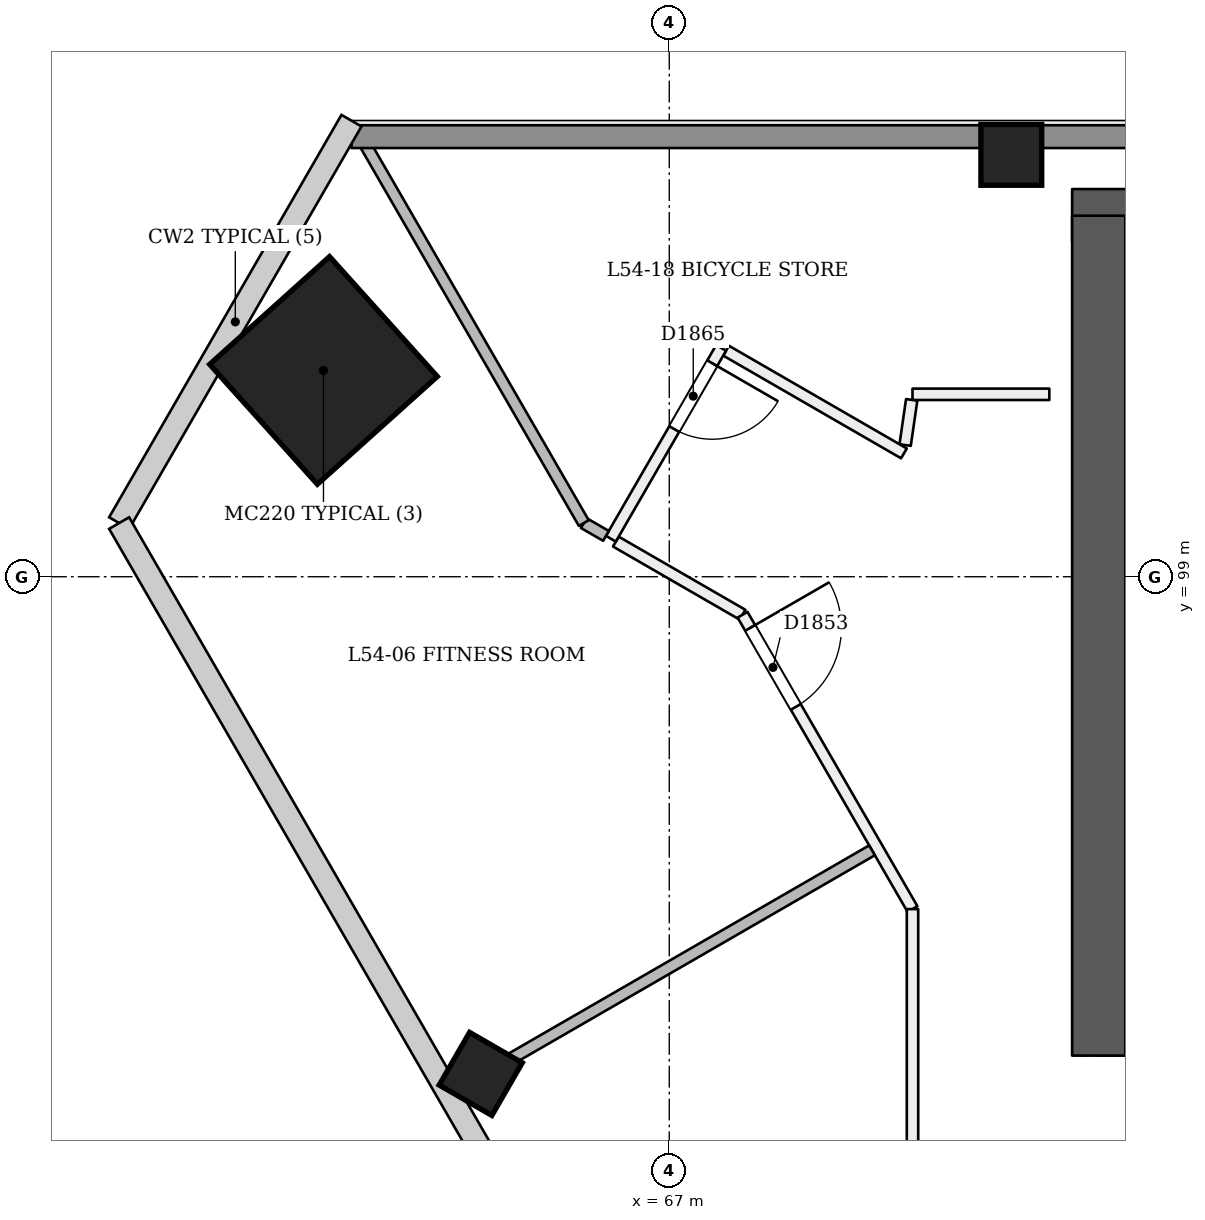
"""IFC4 building model, lengths in metres.
Left out: names, types, materials, properties, quantities, classifications, styles, units other than length and angle.
Written with IfcOpenShell. Run it as: python <this file> out.ifc"""

import sys

from ifc_helpers import new_model, si_unit, direction, frame, frame_2d, origin, origin_2d, place, context, subcontext, project, spatial, rectangle, extrude, element, fill, save


model = new_model("IFC4")
c1 = context("Model", 3, precision=1e-05, world=origin(), true_north=direction((0.0, 1.0)))
c2 = subcontext(c1, "Body", "Model", "MODEL_VIEW")
j1 = project(units=[si_unit("LENGTHUNIT", "METRE"), si_unit("PLANEANGLEUNIT", "RADIAN")], contexts=[c1])
p1 = place(None, origin())
s1 = spatial("IfcSite", under=j1, at=p1, CompositionType="ELEMENT")
p2 = place(p1, origin())
s2 = spatial("IfcBuilding", under=s1, at=p2, CompositionType="ELEMENT")
p3 = place(p2, frame((0.0, 0.0, 208.8)))
s3 = spatial("IfcBuildingStorey", under=s2, at=p3, CompositionType="ELEMENT", Elevation=208.8)
p4 = place(p3, frame((72.65, 93.05, 0.0), z_axis=(0.0, 0.0, 1.0), x_axis=(1.0, 0.0, 0.0)))
e1 = element("IfcWall", 1, at=p4, inside=s3, PredefinedType="SHEAR", context=c2, shape_type="SweptSolid", body=[
    extrude(rectangle(XDim=25.05, YDim=0.7, at=frame_2d((12.525, 0.0))), origin(), (0.0, 0.0, 1.0), 3.6),
])
p5 = place(p4, frame((1.15, 0.0, 0.0)))
e2 = element("IfcOpeningElement", 2, at=p5, cuts=e1, PredefinedType="OPENING", context=c2, shape_type="SweptSolid", body=[
    extrude(rectangle(XDim=1.2, YDim=2.1, at=frame_2d((0.6, 1.05))), frame((0.0, 0.36, 0.0), z_axis=(0.0, -1.0, 0.0), x_axis=(1.0, 0.0, 0.0)), (0.0, 0.0, 1.0), 0.721),
])
p6 = place(p4, frame((3.35, 0.0, 0.0)))
e3 = element("IfcOpeningElement", 3, at=p6, cuts=e1, PredefinedType="OPENING", context=c2, shape_type="SweptSolid", body=[
    extrude(rectangle(XDim=1.2, YDim=2.1, at=frame_2d((0.6, 1.05))), frame((0.0, 0.36, 0.0), z_axis=(0.0, -1.0, 0.0), x_axis=(1.0, 0.0, 0.0)), (0.0, 0.0, 1.0), 0.721),
])
p7 = place(p4, frame((13.35, 0.0, 0.0)))
e4 = element("IfcOpeningElement", 4, at=p7, cuts=e1, PredefinedType="OPENING", context=c2, shape_type="SweptSolid", body=[
    extrude(rectangle(XDim=1.2, YDim=2.1, at=frame_2d((0.6, 1.05))), frame((0.0, 0.36, 0.0), z_axis=(0.0, -1.0, 0.0), x_axis=(1.0, 0.0, 0.0)), (0.0, 0.0, 1.0), 0.721),
])
p8 = place(p4, frame((16.212, 0.0, 0.0)))
e5 = element("IfcOpeningElement", 5, at=p8, cuts=e1, PredefinedType="OPENING", context=c2, shape_type="SweptSolid", body=[
    extrude(rectangle(XDim=1.0, YDim=2.1, at=frame_2d((0.5, 1.05))), frame((0.0, 0.36, 0.0), z_axis=(0.0, -1.0, 0.0), x_axis=(1.0, 0.0, 0.0)), (0.0, 0.0, 1.0), 0.721),
])
p9 = place(p4, frame((19.65, 0.0, 0.0)))
e6 = element("IfcOpeningElement", 6, at=p9, cuts=e1, PredefinedType="OPENING", context=c2, shape_type="SweptSolid", body=[
    extrude(rectangle(XDim=1.0, YDim=2.1, at=frame_2d((0.5, 1.05))), frame((0.0, 0.36, 0.0), z_axis=(0.0, -1.0, 0.0), x_axis=(1.0, 0.0, 0.0)), (0.0, 0.0, 1.0), 0.721),
])
p10 = place(p4, frame((22.637, 0.0, 0.0)))
e7 = element("IfcOpeningElement", 7, at=p10, cuts=e1, PredefinedType="OPENING", context=c2, shape_type="SweptSolid", body=[
    extrude(rectangle(XDim=1.0, YDim=2.1, at=frame_2d((0.5, 1.05))), frame((0.0, 0.36, 0.0), z_axis=(0.0, -1.0, 0.0), x_axis=(1.0, 0.0, 0.0)), (0.0, 0.0, 1.0), 0.721),
])
p11 = place(p3, frame((97.35, 103.75, 0.0), z_axis=(0.0, 0.0, 1.0), x_axis=(-1.0, 0.0, 0.0)))
e8 = element("IfcWall", 8, at=p11, inside=s3, PredefinedType="SHEAR", context=c2, shape_type="SweptSolid", body=[
    extrude(rectangle(XDim=25.05, YDim=0.7, at=frame_2d((12.525, 0.0))), origin(), (0.0, 0.0, 1.0), 3.6),
])
p12 = place(p3, frame((72.65, 103.75, 0.0), z_axis=(0.0, 0.0, 1.0), x_axis=(0.0, -1.0, 0.0)))
e9 = element("IfcWall", 9, at=p12, inside=s3, PredefinedType="SHEAR", context=c2, shape_type="SweptSolid", body=[
    extrude(rectangle(XDim=11.05, YDim=0.7, at=frame_2d((5.525, 0.0))), origin(), (0.0, 0.0, 1.0), 3.6),
])
p13 = place(p3, frame((62.417, 101.703, 0.0), z_axis=(0.028403721265, 0.009287135593, 0.999553389135), x_axis=(-0.866209208882, 0.499282066984, 0.019975585985)))
e10 = element("IfcColumn", 10, at=p13, inside=s3, PredefinedType="COLUMN", context=c2, shape_type="SweptSolid", body=[
    extrude(rectangle(XDim=2.12, YDim=2.12, at=origin_2d()), origin(), (0.0, 0.0, 1.0), 3.602),
])
p14 = place(p3, frame((71.5, 104.55, 0.0), z_axis=(0.0, 0.0, 1.0), x_axis=(1.0, 0.0, 0.0)))
e11 = element("IfcColumn", 11, at=p14, inside=s3, PredefinedType="COLUMN", context=c2, shape_type="SweptSolid", body=[
    extrude(rectangle(XDim=0.8, YDim=0.8, at=origin_2d()), origin(), (0.0, 0.0, 1.0), 3.6),
])
p15 = place(p3, frame((64.492, 92.412, -0.024), z_axis=(0.02215369191, 0.038413282303, 0.999016333038), x_axis=(-0.865364661836, -0.499669122996, 0.038402728683)))
e12 = element("IfcColumn", 12, at=p15, inside=s3, PredefinedType="COLUMN", context=c2, shape_type="SweptSolid", body=[
    extrude(rectangle(XDim=0.8, YDim=0.8, at=origin_2d()), origin(), (0.0, 0.0, 1.0), 3.604),
])
p16 = place(p3, frame((66.297, 99.462, 0.0), z_axis=(0.0, 0.0, 1.0), x_axis=(0.866033512162, -0.499985955615, 0.0)))
e13 = element("IfcWall", 13, at=p16, inside=s3, PredefinedType="PARTITIONING", context=c2, shape_type="SweptSolid", body=[
    extrude(rectangle(XDim=1.925, YDim=0.15, at=frame_2d((0.962, 0.0))), origin(), (0.0, 0.0, 1.0), 3.3),
])
p17 = place(p3, frame((67.964, 98.5, 0.0), z_axis=(0.0, 0.0, 1.0), x_axis=(0.500002867593, -0.866023748172, 0.0)))
e14 = element("IfcWall", 14, at=p17, inside=s3, PredefinedType="PARTITIONING", context=c2, shape_type="SweptSolid", body=[
    extrude(rectangle(XDim=4.472, YDim=0.15, at=frame_2d((2.236, 0.0))), origin(), (0.0, 0.0, 1.0), 3.3),
])
p18 = place(p17, frame((0.2, 0.0, 0.0)))
e15 = element("IfcOpeningElement", 15, at=p18, cuts=e14, PredefinedType="OPENING", context=c2, shape_type="SweptSolid", body=[
    extrude(rectangle(XDim=1.2, YDim=2.1, at=frame_2d((0.6, 1.05))), frame((0.0, 0.085, 0.0), z_axis=(0.0, -1.0, 0.0), x_axis=(1.0, 0.0, 0.0)), (0.0, 0.0, 1.0), 0.171),
])
p19 = place(p3, frame((70.2, 94.627, 0.0), z_axis=(0.0, 0.0, 1.0), x_axis=(0.0, -1.0, 0.0)))
e16 = element("IfcWall", 16, at=p19, inside=s3, PredefinedType="PARTITIONING", context=c2, shape_type="SweptSolid", body=[
    extrude(rectangle(XDim=4.427, YDim=0.15, at=frame_2d((2.214, 0.0))), origin(), (0.0, 0.0, 1.0), 3.3),
])
p20 = place(p3, frame((72.0, 101.4, 0.0), z_axis=(0.0, 0.0, 1.0), x_axis=(-1.0, 0.0, 0.0)))
e17 = element("IfcWall", 17, at=p20, inside=s3, PredefinedType="PARTITIONING", context=c2, shape_type="SweptSolid", body=[
    extrude(rectangle(XDim=1.8, YDim=0.15, at=frame_2d((0.9, 0.0))), origin(), (0.0, 0.0, 1.0), 3.3),
])
p21 = place(p3, frame((70.189, 101.327, 0.0), z_axis=(0.0, 0.0, 1.0), x_axis=(-0.143925367689, -0.989588545071, 0.0)))
e18 = element("IfcWall", 18, at=p21, inside=s3, PredefinedType="PARTITIONING", context=c2, shape_type="SweptSolid", body=[
    extrude(rectangle(XDim=0.601, YDim=0.15, at=frame_2d((0.3, 0.0))), origin(), (0.0, 0.0, 1.0), 3.3),
])
p22 = place(p3, frame((70.087, 100.623, 0.0), z_axis=(0.0, 0.0, 1.0), x_axis=(-0.866060705498, 0.499938850654, 0.0)))
e19 = element("IfcWall", 19, at=p22, inside=s3, PredefinedType="PARTITIONING", context=c2, shape_type="SweptSolid", body=[
    extrude(rectangle(XDim=2.702, YDim=0.15, at=frame_2d((1.351, 0.0))), origin(), (0.0, 0.0, 1.0), 3.3),
])
p23 = place(p3, frame((67.682, 102.011, 0.0), z_axis=(0.0, 0.0, 1.0), x_axis=(-0.499987231761, -0.866032775405, 0.0)))
e20 = element("IfcWall", 20, at=p23, inside=s3, PredefinedType="PARTITIONING", context=c2, shape_type="SweptSolid", body=[
    extrude(rectangle(XDim=2.9, YDim=0.15, at=frame_2d((1.45, 0.0))), origin(), (0.0, 0.0, 1.0), 3.3),
])
p24 = place(p23, frame((0.234, 0.0, 0.0)))
e21 = element("IfcOpeningElement", 21, at=p24, cuts=e20, PredefinedType="OPENING", context=c2, shape_type="SweptSolid", body=[
    extrude(rectangle(XDim=1.0, YDim=2.1, at=frame_2d((0.5, 1.05))), frame((0.0, 0.085, 0.0), z_axis=(0.0, -1.0, 0.0), x_axis=(1.0, 0.0, 0.0)), (0.0, 0.0, 1.0), 0.171),
])
p25 = place(p3, frame((64.189, 92.238, 0.0), z_axis=(0.0, 0.0, 1.0), x_axis=(0.866042250622, 0.499970819286, 0.0)))
e22 = element("IfcWall", 22, at=p25, inside=s3, PredefinedType="PARTITIONING", context=c2, shape_type="SweptSolid", body=[
    extrude(rectangle(XDim=6.325, YDim=0.15, at=frame_2d((3.163, 0.0))), origin(), (0.0, 0.0, 1.0), 2.8),
])
p26 = place(p3, frame((66.167, 99.538, 0.0), z_axis=(0.0, 0.0, 1.0), x_axis=(-0.866004557827, 0.500036104519, 0.0)))
e23 = element("IfcWall", 23, at=p26, inside=s3, PredefinedType="PARTITIONING", context=c2, shape_type="SweptSolid", body=[
    extrude(rectangle(XDim=0.337, YDim=0.15, at=frame_2d((0.168, 0.0))), origin(), (0.0, 0.0, 1.0), 3.3),
])
p27 = place(p3, frame((65.875, 99.706, 0.0), z_axis=(0.0, 0.0, 1.0), x_axis=(-0.500013750211, 0.866017464951, 0.0)))
e24 = element("IfcWall", 24, at=p27, inside=s3, PredefinedType="PARTITIONING", context=c2, shape_type="SweptSolid", body=[
    extrude(rectangle(XDim=5.997, YDim=0.15, at=frame_2d((2.999, 0.0))), origin(), (0.0, 0.0, 1.0), 2.8),
])
p28 = place(p3, frame((62.819, 104.79, 0.0), z_axis=(0.0, 0.0, 1.0), x_axis=(1.0, 0.0, 0.0)))
e25 = element("IfcWall", 25, at=p28, inside=s3, PredefinedType="SOLIDWALL", context=c2, shape_type="SweptSolid", body=[
    extrude(rectangle(XDim=44.362, YDim=0.3, at=frame_2d((22.181, 0.0))), origin(), (0.0, 0.0, 1.0), 2.8),
])
p29 = place(p18, origin())
e26 = element("IfcDoor", 26, at=p29, inside=s3, OperationType="SINGLE_SWING_LEFT", PredefinedType="NOTDEFINED", context=c2, shape_type="SweptSolid", body=[
    extrude(rectangle(XDim=1.2, YDim=2.1, at=frame_2d((0.6, 1.05))), frame((0.0, 0.025, 0.0), z_axis=(0.0, -1.0, 0.0), x_axis=(1.0, 0.0, 0.0)), (0.0, 0.0, 1.0), 0.05),
])
fill(e15, e26)
p30 = place(p24, origin())
e27 = element("IfcDoor", 27, at=p30, inside=s3, OperationType="SINGLE_SWING_LEFT", PredefinedType="NOTDEFINED", context=c2, shape_type="SweptSolid", body=[
    extrude(rectangle(XDim=1.0, YDim=2.1, at=frame_2d((0.5, 1.05))), frame((0.0, 0.025, 0.0), z_axis=(0.0, -1.0, 0.0), x_axis=(1.0, 0.0, 0.0)), (0.0, 0.0, 1.0), 0.05),
])
fill(e21, e27)
save(model, sys.argv[1])
